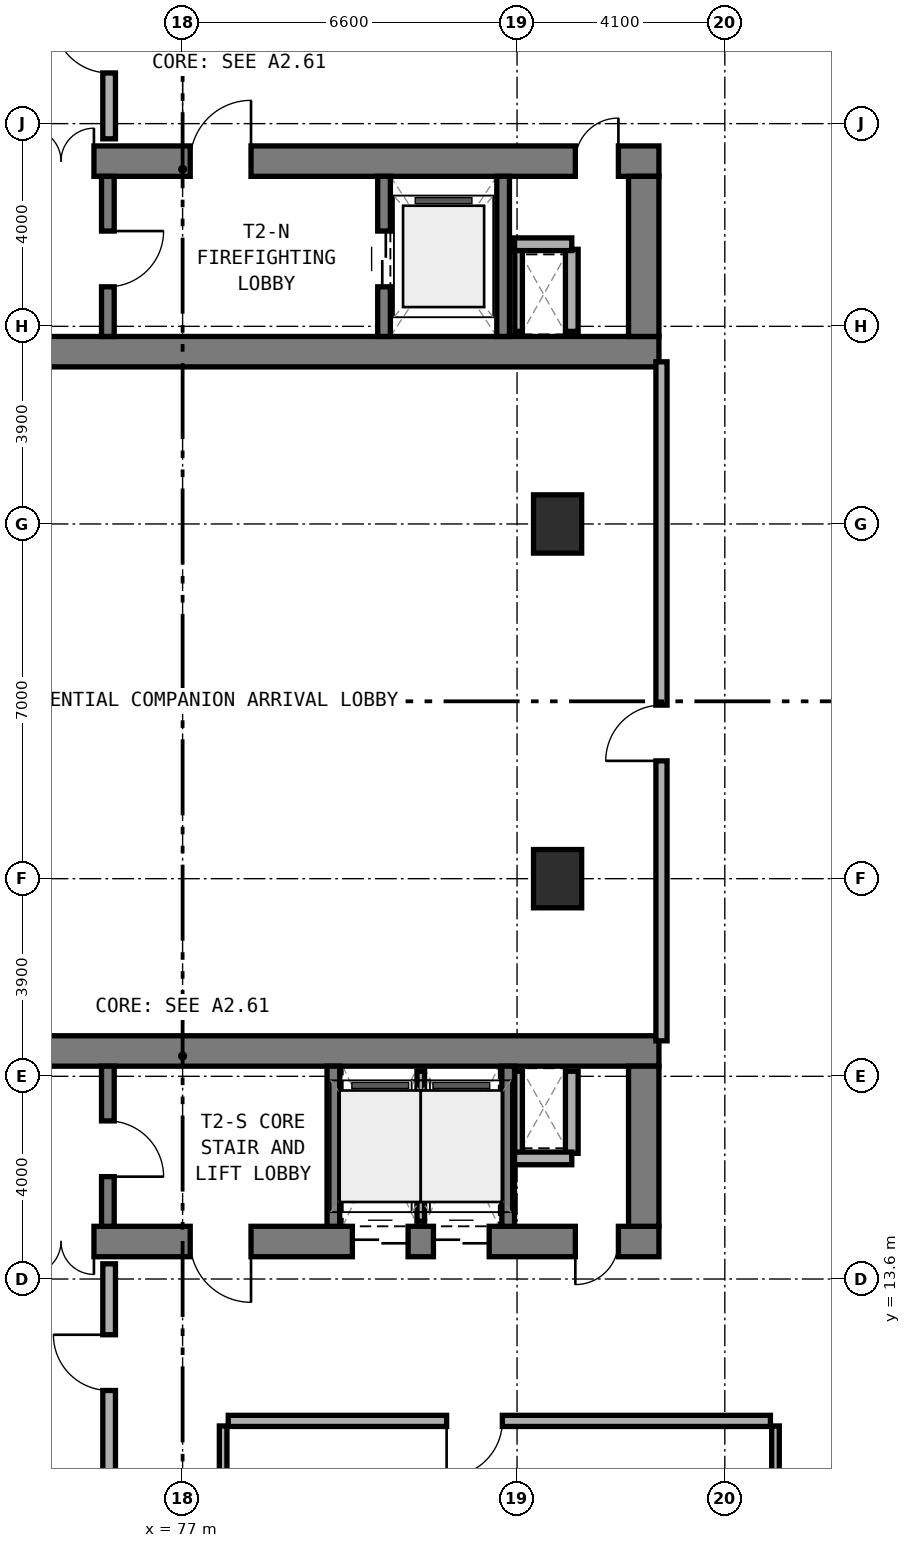
"""IFC4 building model, lengths in metres.
Left out: names, types, materials, properties, quantities, classifications, styles, units other than length and angle.
Written with IfcOpenShell. Run it as: python <this file> out.ifc"""

import sys

from ifc_helpers import new_model, si_unit, direction, frame, frame_2d, origin, origin_2d, place, context, subcontext, project, spatial, rectangle, extrude, element, fill, save


model = new_model("IFC4")
c1 = context("Model", 3, precision=1e-05, world=origin(), true_north=direction((0.0, 1.0)))
c2 = subcontext(c1, "Body", "Model", "MODEL_VIEW")
j1 = project(units=[si_unit("LENGTHUNIT", "METRE"), si_unit("PLANEANGLEUNIT", "RADIAN")], contexts=[c1])
p1 = place(None, origin())
s1 = spatial("IfcSite", under=j1, at=p1, CompositionType="ELEMENT")
p2 = place(p1, origin())
s2 = spatial("IfcBuilding", under=s1, at=p2, CompositionType="ELEMENT")
p3 = place(p2, origin())
s3 = spatial("IfcBuildingStorey", under=s2, at=p3, CompositionType="ELEMENT", Elevation=0.0)
p4 = place(p3, frame((67.8, 31.9, 0.0), z_axis=(0.0, 0.0, 1.0), x_axis=(1.0, 0.0, 0.0)))
e1 = element("IfcWall", 1, at=p4, inside=s3, PredefinedType="SHEAR", context=c2, shape_type="SweptSolid", body=[
    extrude(rectangle(XDim=18.6, YDim=0.6, at=frame_2d((9.3, 0.0))), origin(), (0.0, 0.0, 1.0), 5.4),
])
p5 = place(p3, frame((67.8, 35.66, 0.0), z_axis=(0.0, 0.0, 1.0), x_axis=(1.0, 0.0, 0.0)))
e2 = element("IfcWall", 2, at=p5, inside=s3, PredefinedType="SHEAR", context=c2, shape_type="SweptSolid", body=[
    extrude(rectangle(XDim=18.6, YDim=0.6, at=frame_2d((9.3, 0.0))), origin(), (0.0, 0.0, 1.0), 5.4),
])
p6 = place(p5, frame((9.35, 0.0, 0.0)))
e3 = element("IfcOpeningElement", 3, at=p6, cuts=e2, PredefinedType="OPENING", context=c2, shape_type="SweptSolid", body=[
    extrude(rectangle(XDim=1.2, YDim=2.15, at=frame_2d((0.6, 1.075))), frame((0.0, 0.31, 0.0), z_axis=(0.0, -1.0, 0.0), x_axis=(1.0, 0.0, 0.0)), (0.0, 0.0, 1.0), 0.62),
])
p7 = place(p5, frame((6.15, 0.0, 0.0)))
e4 = element("IfcOpeningElement", 4, at=p7, cuts=e2, PredefinedType="OPENING", context=c2, shape_type="SweptSolid", body=[
    extrude(rectangle(XDim=1.3, YDim=2.15, at=frame_2d((0.65, 1.075))), frame((0.0, 0.31, 0.0), z_axis=(0.0, -1.0, 0.0), x_axis=(1.0, 0.0, 0.0)), (0.0, 0.0, 1.0), 0.62),
])
p8 = place(p5, frame((16.95, 0.0, 0.0)))
e5 = element("IfcOpeningElement", 5, at=p8, cuts=e2, PredefinedType="OPENING", context=c2, shape_type="SweptSolid", body=[
    extrude(rectangle(XDim=0.85, YDim=2.1, at=frame_2d((0.425, 1.05))), frame((0.0, 0.31, 0.0), z_axis=(0.0, -1.0, 0.0), x_axis=(1.0, 0.0, 0.0)), (0.0, 0.0, 1.0), 0.62),
])
p9 = place(p3, frame((86.1, 32.2, 0.0), z_axis=(0.0, 0.0, 1.0), x_axis=(0.0, 1.0, 0.0)))
e6 = element("IfcWall", 6, at=p9, inside=s3, PredefinedType="SHEAR", context=c2, shape_type="SweptSolid", body=[
    extrude(rectangle(XDim=3.16, YDim=0.6, at=frame_2d((1.58, 0.0))), origin(), (0.0, 0.0, 1.0), 5.4),
])
p10 = place(p3, frame((75.525, 32.2, 0.0), z_axis=(0.0, 0.0, 1.0), x_axis=(0.0, 1.0, 0.0)))
e7 = element("IfcWall", 7, at=p10, inside=s3, PredefinedType="STANDARD", context=c2, shape_type="SweptSolid", body=[
    extrude(rectangle(XDim=3.16, YDim=0.25, at=frame_2d((1.58, 0.0))), origin(), (0.0, 0.0, 1.0), 5.05),
])
p11 = place(p10, frame((0.98, 0.0, 0.0)))
e8 = element("IfcOpeningElement", 8, at=p11, cuts=e7, PredefinedType="OPENING", context=c2, shape_type="SweptSolid", body=[
    extrude(rectangle(XDim=1.1, YDim=2.15, at=frame_2d((0.55, 1.075))), frame((0.0, 0.135, 0.0), z_axis=(0.0, -1.0, 0.0), x_axis=(1.0, 0.0, 0.0)), (0.0, 0.0, 1.0), 0.27),
])
p12 = place(p3, frame((80.975, 32.2, 0.0), z_axis=(0.0, 0.0, 1.0), x_axis=(0.0, 1.0, 0.0)))
e9 = element("IfcWall", 9, at=p12, inside=s3, PredefinedType="STANDARD", context=c2, shape_type="SweptSolid", body=[
    extrude(rectangle(XDim=3.16, YDim=0.25, at=frame_2d((1.58, 0.0))), origin(), (0.0, 0.0, 1.0), 5.05),
])
p13 = place(p12, frame((0.98, 0.0, 0.0)))
e10 = element("IfcOpeningElement", 10, at=p13, cuts=e9, PredefinedType="OPENING", context=c2, shape_type="SweptSolid", body=[
    extrude(rectangle(XDim=1.1, YDim=2.15, at=frame_2d((0.55, 1.075))), frame((0.0, 0.135, 0.0), z_axis=(0.0, -1.0, 0.0), x_axis=(1.0, 0.0, 0.0)), (0.0, 0.0, 1.0), 0.27),
])
p14 = place(p3, frame((83.325, 32.2, 0.0), z_axis=(0.0, 0.0, 1.0), x_axis=(0.0, 1.0, 0.0)))
e11 = element("IfcWall", 11, at=p14, inside=s3, PredefinedType="STANDARD", context=c2, shape_type="SweptSolid", body=[
    extrude(rectangle(XDim=3.16, YDim=0.25, at=frame_2d((1.58, 0.0))), origin(), (0.0, 0.0, 1.0), 5.05),
])
p15 = place(p3, frame((67.8, 14.34, 0.0), z_axis=(0.0, 0.0, 1.0), x_axis=(1.0, 0.0, 0.0)))
e12 = element("IfcWall", 12, at=p15, inside=s3, PredefinedType="SHEAR", context=c2, shape_type="SweptSolid", body=[
    extrude(rectangle(XDim=18.6, YDim=0.6, at=frame_2d((9.3, 0.0))), origin(), (0.0, 0.0, 1.0), 5.4),
])
p16 = place(p15, frame((9.35, 0.0, 0.0)))
e13 = element("IfcOpeningElement", 13, at=p16, cuts=e12, PredefinedType="OPENING", context=c2, shape_type="SweptSolid", body=[
    extrude(rectangle(XDim=1.2, YDim=2.15, at=frame_2d((0.6, 1.075))), frame((0.0, 0.31, 0.0), z_axis=(0.0, -1.0, 0.0), x_axis=(1.0, 0.0, 0.0)), (0.0, 0.0, 1.0), 0.62),
])
p17 = place(p15, frame((6.15, 0.0, 0.0)))
e14 = element("IfcOpeningElement", 14, at=p17, cuts=e12, PredefinedType="OPENING", context=c2, shape_type="SweptSolid", body=[
    extrude(rectangle(XDim=1.3, YDim=2.15, at=frame_2d((0.65, 1.075))), frame((0.0, 0.31, 0.0), z_axis=(0.0, -1.0, 0.0), x_axis=(1.0, 0.0, 0.0)), (0.0, 0.0, 1.0), 0.62),
])
p18 = place(p15, frame((16.95, 0.0, 0.0)))
e15 = element("IfcOpeningElement", 15, at=p18, cuts=e12, PredefinedType="OPENING", context=c2, shape_type="SweptSolid", body=[
    extrude(rectangle(XDim=0.85, YDim=2.1, at=frame_2d((0.425, 1.05))), frame((0.0, 0.31, 0.0), z_axis=(0.0, -1.0, 0.0), x_axis=(1.0, 0.0, 0.0)), (0.0, 0.0, 1.0), 0.62),
])
p19 = place(p15, frame((12.55, 0.0, 0.0)))
e16 = element("IfcOpeningElement", 16, at=p19, cuts=e12, PredefinedType="OPENING", context=c2, shape_type="SweptSolid", body=[
    extrude(rectangle(XDim=1.1, YDim=2.15, at=frame_2d((0.55, 1.075))), frame((0.0, 0.31, 0.0), z_axis=(0.0, -1.0, 0.0), x_axis=(1.0, 0.0, 0.0)), (0.0, 0.0, 1.0), 0.62),
])
p20 = place(p15, frame((14.15, 0.0, 0.0)))
e17 = element("IfcOpeningElement", 17, at=p20, cuts=e12, PredefinedType="OPENING", context=c2, shape_type="SweptSolid", body=[
    extrude(rectangle(XDim=1.1, YDim=2.15, at=frame_2d((0.55, 1.075))), frame((0.0, 0.31, 0.0), z_axis=(0.0, -1.0, 0.0), x_axis=(1.0, 0.0, 0.0)), (0.0, 0.0, 1.0), 0.62),
])
p21 = place(p3, frame((67.8, 18.1, 0.0), z_axis=(0.0, 0.0, 1.0), x_axis=(1.0, 0.0, 0.0)))
e18 = element("IfcWall", 18, at=p21, inside=s3, PredefinedType="SHEAR", context=c2, shape_type="SweptSolid", body=[
    extrude(rectangle(XDim=18.6, YDim=0.6, at=frame_2d((9.3, 0.0))), origin(), (0.0, 0.0, 1.0), 5.4),
])
p22 = place(p3, frame((86.1, 14.64, 0.0), z_axis=(0.0, 0.0, 1.0), x_axis=(0.0, 1.0, 0.0)))
e19 = element("IfcWall", 19, at=p22, inside=s3, PredefinedType="SHEAR", context=c2, shape_type="SweptSolid", body=[
    extrude(rectangle(XDim=3.16, YDim=0.6, at=frame_2d((1.58, 0.0))), origin(), (0.0, 0.0, 1.0), 5.4),
])
p23 = place(p3, frame((75.525, 14.64, 0.0), z_axis=(0.0, 0.0, 1.0), x_axis=(0.0, 1.0, 0.0)))
e20 = element("IfcWall", 20, at=p23, inside=s3, PredefinedType="STANDARD", context=c2, shape_type="SweptSolid", body=[
    extrude(rectangle(XDim=3.16, YDim=0.25, at=frame_2d((1.58, 0.0))), origin(), (0.0, 0.0, 1.0), 5.05),
])
p24 = place(p23, frame((0.98, 0.0, 0.0)))
e21 = element("IfcOpeningElement", 21, at=p24, cuts=e20, PredefinedType="OPENING", context=c2, shape_type="SweptSolid", body=[
    extrude(rectangle(XDim=1.1, YDim=2.15, at=frame_2d((0.55, 1.075))), frame((0.0, 0.135, 0.0), z_axis=(0.0, -1.0, 0.0), x_axis=(1.0, 0.0, 0.0)), (0.0, 0.0, 1.0), 0.27),
])
for number, where, z_axis, x_axis in (
    (22, (79.975, 14.64, 0.0), (0.0, 0.0, 1.0), (0.0, 1.0, 0.0)),
    (23, (83.425, 14.64, 0.0), (0.0, 0.0, 1.0), (0.0, 1.0, 0.0)),
):
    element("IfcWall", number, at=place(p3, frame(where, z_axis=z_axis, x_axis=x_axis)), inside=s3, PredefinedType="STANDARD", context=c2, shape_type="SweptSolid", body=[
        extrude(rectangle(XDim=3.16, YDim=0.25, at=frame_2d((1.58, 0.0))), origin(), (0.0, 0.0, 1.0), 5.05),
    ])
for number, where, z_axis, x_axis in (
    (24, (84.4, 21.5, 0.0), (0.0, 0.0, 1.0), (1.0, 0.0, 0.0)),
    (25, (84.4, 28.5, 0.0), (0.0, 0.0, 1.0), (1.0, 0.0, 0.0)),
):
    element("IfcColumn", number, at=place(p3, frame(where, z_axis=z_axis, x_axis=x_axis)), inside=s3, PredefinedType="COLUMN", context=c2, shape_type="SweptSolid", body=[
        extrude(rectangle(XDim=0.95, YDim=1.15, at=origin_2d()), origin(), (0.0, 0.0, 1.0), 5.4),
    ])
p25 = place(p3, frame((83.63, 32.3, 0.0), z_axis=(0.0, 0.0, 1.0), x_axis=(0.0, 1.0, 0.0)))
e26 = element("IfcWall", 26, at=p25, inside=s3, PredefinedType="PARTITIONING", context=c2, shape_type="SweptSolid", body=[
    extrude(rectangle(XDim=1.62, YDim=0.15, at=frame_2d((0.81, 0.0))), origin(), (0.0, 0.0, 1.0), 4.525),
])
p26 = place(p3, frame((84.68, 32.3, 0.0), z_axis=(0.0, 0.0, 1.0), x_axis=(0.0, 1.0, 0.0)))
e27 = element("IfcWall", 27, at=p26, inside=s3, PredefinedType="SOLIDWALL", context=c2, shape_type="SweptSolid", body=[
    extrude(rectangle(XDim=1.62, YDim=0.25, at=frame_2d((0.81, 0.0))), origin(), (0.0, 0.0, 1.0), 5.05),
])
p27 = place(p3, frame((83.55, 34.02, 0.0), z_axis=(0.0, 0.0, 1.0), x_axis=(1.0, 0.0, 0.0)))
e28 = element("IfcWall", 28, at=p27, inside=s3, PredefinedType="SOLIDWALL", context=c2, shape_type="SweptSolid", body=[
    extrude(rectangle(XDim=1.13, YDim=0.25, at=frame_2d((0.565, 0.0))), origin(), (0.0, 0.0, 1.0), 5.05),
])
p28 = place(p3, frame((83.63, 16.08, 0.0), z_axis=(0.0, 0.0, 1.0), x_axis=(0.0, 1.0, 0.0)))
e29 = element("IfcWall", 29, at=p28, inside=s3, PredefinedType="PARTITIONING", context=c2, shape_type="SweptSolid", body=[
    extrude(rectangle(XDim=1.62, YDim=0.15, at=frame_2d((0.81, 0.0))), origin(), (0.0, 0.0, 1.0), 4.525),
])
p29 = place(p3, frame((84.68, 16.08, 0.0), z_axis=(0.0, 0.0, 1.0), x_axis=(0.0, 1.0, 0.0)))
e30 = element("IfcWall", 30, at=p29, inside=s3, PredefinedType="SOLIDWALL", context=c2, shape_type="SweptSolid", body=[
    extrude(rectangle(XDim=1.62, YDim=0.25, at=frame_2d((0.81, 0.0))), origin(), (0.0, 0.0, 1.0), 5.05),
])
p30 = place(p3, frame((83.55, 15.98, 0.0), z_axis=(0.0, 0.0, 1.0), x_axis=(1.0, 0.0, 0.0)))
e31 = element("IfcWall", 31, at=p30, inside=s3, PredefinedType="SOLIDWALL", context=c2, shape_type="SweptSolid", body=[
    extrude(rectangle(XDim=1.13, YDim=0.25, at=frame_2d((0.565, 0.0))), origin(), (0.0, 0.0, 1.0), 5.05),
])
p31 = place(p3, frame((81.7, 14.74, 0.0), z_axis=(0.0, 0.0, 1.0), x_axis=(0.0, 1.0, 0.0)))
e32 = element("IfcWall", 32, at=p31, inside=s3, PredefinedType="PARTITIONING", context=c2, shape_type="SweptSolid", body=[
    extrude(rectangle(XDim=2.96, YDim=0.15, at=frame_2d((1.48, 0.0))), origin(), (0.0, 0.0, 1.0), 5.05),
])
p32 = place(p3, frame((75.55, 36.1, 0.0), z_axis=(0.0, 0.0, 1.0), x_axis=(0.0, 1.0, 0.0)))
e33 = element("IfcWall", 33, at=p32, inside=s3, PredefinedType="SOLIDWALL", context=c2, shape_type="SweptSolid", body=[
    extrude(rectangle(XDim=13.45, YDim=0.25, at=frame_2d((6.725, 0.0))), origin(), (0.0, 0.0, 1.0), 4.425),
])
p33 = place(p32, frame((1.3, 0.0, 0.0)))
e34 = element("IfcOpeningElement", 34, at=p33, cuts=e33, PredefinedType="OPENING", context=c2, shape_type="SweptSolid", body=[
    extrude(rectangle(XDim=1.1, YDim=2.15, at=frame_2d((0.55, 1.075))), frame((0.0, 0.135, 0.0), z_axis=(0.0, -1.0, 0.0), x_axis=(1.0, 0.0, 0.0)), (0.0, 0.0, 1.0), 0.27),
])
p34 = place(p3, frame((75.55, 0.45, 0.0), z_axis=(0.0, 0.0, 1.0), x_axis=(0.0, 1.0, 0.0)))
e35 = element("IfcWall", 35, at=p34, inside=s3, PredefinedType="SOLIDWALL", context=c2, shape_type="SweptSolid", body=[
    extrude(rectangle(XDim=13.45, YDim=0.25, at=frame_2d((6.725, 0.0))), origin(), (0.0, 0.0, 1.0), 4.425),
])
p35 = place(p34, frame((10.95, 0.0, 0.0)))
e36 = element("IfcOpeningElement", 36, at=p35, cuts=e35, PredefinedType="OPENING", context=c2, shape_type="SweptSolid", body=[
    extrude(rectangle(XDim=1.1, YDim=2.15, at=frame_2d((0.55, 1.075))), frame((0.0, 0.135, 0.0), z_axis=(0.0, -1.0, 0.0), x_axis=(1.0, 0.0, 0.0)), (0.0, 0.0, 1.0), 0.27),
])
p36 = place(p3, frame((86.45, 18.3, 0.0), z_axis=(0.0, 0.0, 1.0), x_axis=(0.0, 1.0, 0.0)))
e37 = element("IfcWall", 37, at=p36, inside=s3, PredefinedType="SOLIDWALL", context=c2, shape_type="SweptSolid", body=[
    extrude(rectangle(XDim=13.4, YDim=0.22, at=frame_2d((6.7, 0.0))), origin(), (0.0, 0.0, 1.0), 4.525),
])
p37 = place(p36, frame((5.525, 0.0, 0.0)))
e38 = element("IfcOpeningElement", 38, at=p37, cuts=e37, PredefinedType="OPENING", context=c2, shape_type="SweptSolid", body=[
    extrude(rectangle(XDim=1.1, YDim=2.1, at=frame_2d((0.55, 1.05))), frame((0.0, 0.12, 0.0), z_axis=(0.0, -1.0, 0.0), x_axis=(1.0, 0.0, 0.0)), (0.0, 0.0, 1.0), 0.24),
])
p38 = place(p3, frame((77.8, 0.48, 0.0), z_axis=(0.0, 0.0, 1.0), x_axis=(0.0, 1.0, 0.0)))
e39 = element("IfcWall", 39, at=p38, inside=s3, PredefinedType="PARTITIONING", context=c2, shape_type="SweptSolid", body=[
    extrude(rectangle(XDim=10.22, YDim=0.15, at=frame_2d((5.11, 0.0))), origin(), (0.0, 0.0, 1.0), 4.425),
])
p39 = place(p3, frame((88.7, 0.48, 0.0), z_axis=(0.0, 0.0, 1.0), x_axis=(0.0, 1.0, 0.0)))
e40 = element("IfcWall", 40, at=p39, inside=s3, PredefinedType="PARTITIONING", context=c2, shape_type="SweptSolid", body=[
    extrude(rectangle(XDim=10.22, YDim=0.15, at=frame_2d((5.11, 0.0))), origin(), (0.0, 0.0, 1.0), 4.225),
])
p40 = place(p3, frame((77.9, 10.8, 0.0), z_axis=(0.0, 0.0, 1.0), x_axis=(1.0, 0.0, 0.0)))
e41 = element("IfcWall", 41, at=p40, inside=s3, PredefinedType="SOLIDWALL", context=c2, shape_type="SweptSolid", body=[
    extrude(rectangle(XDim=10.7, YDim=0.22, at=frame_2d((5.35, 0.0))), origin(), (0.0, 0.0, 1.0), 4.525),
])
p41 = place(p40, frame((4.31, 0.0, 0.0)))
e42 = element("IfcOpeningElement", 42, at=p41, cuts=e41, PredefinedType="OPENING", context=c2, shape_type="SweptSolid", body=[
    extrude(rectangle(XDim=1.1, YDim=2.1, at=frame_2d((0.55, 1.05))), frame((0.0, 0.12, 0.0), z_axis=(0.0, -1.0, 0.0), x_axis=(1.0, 0.0, 0.0)), (0.0, 0.0, 1.0), 0.24),
])
p42 = place(p11, frame((1.1, 0.0, 0.0), z_axis=(0.0, 0.0, 1.0), x_axis=(-1.0, 0.0, 0.0)))
e43 = element("IfcDoor", 43, at=p42, inside=s3, OperationType="SINGLE_SWING_LEFT", PredefinedType="DOOR", context=c2, shape_type="SweptSolid", body=[
    extrude(rectangle(XDim=1.1, YDim=2.15, at=frame_2d((0.55, 1.075))), frame((0.0, 0.025, 0.0), z_axis=(0.0, -1.0, 0.0), x_axis=(1.0, 0.0, 0.0)), (0.0, 0.0, 1.0), 0.05),
])
fill(e8, e43)
p43 = place(p6, origin())
e44 = element("IfcDoor", 44, at=p43, inside=s3, OperationType="SINGLE_SWING_RIGHT", PredefinedType="DOOR", context=c2, shape_type="SweptSolid", body=[
    extrude(rectangle(XDim=1.2, YDim=2.15, at=frame_2d((0.6, 1.075))), frame((0.0, 0.025, 0.0), z_axis=(0.0, -1.0, 0.0), x_axis=(1.0, 0.0, 0.0)), (0.0, 0.0, 1.0), 0.05),
])
fill(e3, e44)
p44 = place(p7, origin())
e45 = element("IfcDoor", 45, at=p44, inside=s3, OperationType="DOUBLE_DOOR_SINGLE_SWING", PredefinedType="DOOR", context=c2, shape_type="SweptSolid", body=[
    extrude(rectangle(XDim=1.3, YDim=2.15, at=frame_2d((0.65, 1.075))), frame((0.0, 0.025, 0.0), z_axis=(0.0, -1.0, 0.0), x_axis=(1.0, 0.0, 0.0)), (0.0, 0.0, 1.0), 0.05),
])
fill(e4, e45)
p45 = place(p13, origin())
e46 = element("IfcDoor", 46, at=p45, inside=s3, OperationType="DOUBLE_DOOR_SLIDING", PredefinedType="DOOR", context=c2, shape_type="SweptSolid", body=[
    extrude(rectangle(XDim=1.1, YDim=2.15, at=frame_2d((0.55, 1.075))), frame((0.0, 0.025, 0.0), z_axis=(0.0, -1.0, 0.0), x_axis=(1.0, 0.0, 0.0)), (0.0, 0.0, 1.0), 0.05),
])
fill(e10, e46)
p46 = place(p8, origin())
e47 = element("IfcDoor", 47, at=p46, inside=s3, OperationType="SINGLE_SWING_RIGHT", PredefinedType="DOOR", context=c2, shape_type="SweptSolid", body=[
    extrude(rectangle(XDim=0.85, YDim=2.1, at=frame_2d((0.425, 1.05))), frame((0.0, 0.025, 0.0), z_axis=(0.0, -1.0, 0.0), x_axis=(1.0, 0.0, 0.0)), (0.0, 0.0, 1.0), 0.05),
])
fill(e5, e47)
p47 = place(p24, frame((1.1, 0.0, 0.0), z_axis=(0.0, 0.0, 1.0), x_axis=(-1.0, 0.0, 0.0)))
e48 = element("IfcDoor", 48, at=p47, inside=s3, OperationType="SINGLE_SWING_RIGHT", PredefinedType="DOOR", context=c2, shape_type="SweptSolid", body=[
    extrude(rectangle(XDim=1.1, YDim=2.15, at=frame_2d((0.55, 1.075))), frame((0.0, 0.025, 0.0), z_axis=(0.0, -1.0, 0.0), x_axis=(1.0, 0.0, 0.0)), (0.0, 0.0, 1.0), 0.05),
])
fill(e21, e48)
p48 = place(p16, frame((1.2, 0.0, 0.0), z_axis=(0.0, 0.0, 1.0), x_axis=(-1.0, 0.0, 0.0)))
e49 = element("IfcDoor", 49, at=p48, inside=s3, OperationType="SINGLE_SWING_LEFT", PredefinedType="DOOR", context=c2, shape_type="SweptSolid", body=[
    extrude(rectangle(XDim=1.2, YDim=2.15, at=frame_2d((0.6, 1.075))), frame((0.0, 0.025, 0.0), z_axis=(0.0, -1.0, 0.0), x_axis=(1.0, 0.0, 0.0)), (0.0, 0.0, 1.0), 0.05),
])
fill(e13, e49)
p49 = place(p17, frame((1.3, 0.0, 0.0), z_axis=(0.0, 0.0, 1.0), x_axis=(-1.0, 0.0, 0.0)))
e50 = element("IfcDoor", 50, at=p49, inside=s3, OperationType="DOUBLE_DOOR_SINGLE_SWING", PredefinedType="DOOR", context=c2, shape_type="SweptSolid", body=[
    extrude(rectangle(XDim=1.3, YDim=2.15, at=frame_2d((0.65, 1.075))), frame((0.0, 0.025, 0.0), z_axis=(0.0, -1.0, 0.0), x_axis=(1.0, 0.0, 0.0)), (0.0, 0.0, 1.0), 0.05),
])
fill(e14, e50)
p50 = place(p18, frame((0.85, 0.0, 0.0), z_axis=(0.0, 0.0, 1.0), x_axis=(-1.0, 0.0, 0.0)))
e51 = element("IfcDoor", 51, at=p50, inside=s3, OperationType="SINGLE_SWING_RIGHT", PredefinedType="DOOR", context=c2, shape_type="SweptSolid", body=[
    extrude(rectangle(XDim=0.85, YDim=2.1, at=frame_2d((0.425, 1.05))), frame((0.0, 0.025, 0.0), z_axis=(0.0, -1.0, 0.0), x_axis=(1.0, 0.0, 0.0)), (0.0, 0.0, 1.0), 0.05),
])
fill(e15, e51)
p51 = place(p19, frame((1.1, 0.0, 0.0), z_axis=(0.0, 0.0, 1.0), x_axis=(-1.0, 0.0, 0.0)))
e52 = element("IfcDoor", 52, at=p51, inside=s3, OperationType="DOUBLE_DOOR_SLIDING", PredefinedType="DOOR", context=c2, shape_type="SweptSolid", body=[
    extrude(rectangle(XDim=1.1, YDim=2.15, at=frame_2d((0.55, 1.075))), frame((0.0, 0.025, 0.0), z_axis=(0.0, -1.0, 0.0), x_axis=(1.0, 0.0, 0.0)), (0.0, 0.0, 1.0), 0.05),
])
fill(e16, e52)
p52 = place(p20, frame((1.1, 0.0, 0.0), z_axis=(0.0, 0.0, 1.0), x_axis=(-1.0, 0.0, 0.0)))
e53 = element("IfcDoor", 53, at=p52, inside=s3, OperationType="DOUBLE_DOOR_SLIDING", PredefinedType="DOOR", context=c2, shape_type="SweptSolid", body=[
    extrude(rectangle(XDim=1.1, YDim=2.15, at=frame_2d((0.55, 1.075))), frame((0.0, 0.025, 0.0), z_axis=(0.0, -1.0, 0.0), x_axis=(1.0, 0.0, 0.0)), (0.0, 0.0, 1.0), 0.05),
])
fill(e17, e53)
p53 = place(p33, origin())
e54 = element("IfcDoor", 54, at=p53, inside=s3, OperationType="SINGLE_SWING_RIGHT", PredefinedType="DOOR", context=c2, shape_type="SweptSolid", body=[
    extrude(rectangle(XDim=1.1, YDim=2.15, at=frame_2d((0.55, 1.075))), frame((0.0, 0.025, 0.0), z_axis=(0.0, -1.0, 0.0), x_axis=(1.0, 0.0, 0.0)), (0.0, 0.0, 1.0), 0.05),
])
fill(e34, e54)
p54 = place(p35, origin())
e55 = element("IfcDoor", 55, at=p54, inside=s3, OperationType="SINGLE_SWING_RIGHT", PredefinedType="DOOR", context=c2, shape_type="SweptSolid", body=[
    extrude(rectangle(XDim=1.1, YDim=2.15, at=frame_2d((0.55, 1.075))), frame((0.0, 0.025, 0.0), z_axis=(0.0, -1.0, 0.0), x_axis=(1.0, 0.0, 0.0)), (0.0, 0.0, 1.0), 0.05),
])
fill(e36, e55)
p55 = place(p37, origin())
e56 = element("IfcDoor", 56, at=p55, inside=s3, OperationType="SINGLE_SWING_LEFT", PredefinedType="DOOR", context=c2, shape_type="SweptSolid", body=[
    extrude(rectangle(XDim=1.1, YDim=2.1, at=frame_2d((0.55, 1.05))), frame((0.0, 0.025, 0.0), z_axis=(0.0, -1.0, 0.0), x_axis=(1.0, 0.0, 0.0)), (0.0, 0.0, 1.0), 0.05),
])
fill(e38, e56)
p56 = place(p41, frame((1.1, 0.0, 0.0), z_axis=(0.0, 0.0, 1.0), x_axis=(-1.0, 0.0, 0.0)))
e57 = element("IfcDoor", 57, at=p56, inside=s3, OperationType="SINGLE_SWING_RIGHT", PredefinedType="DOOR", context=c2, shape_type="SweptSolid", body=[
    extrude(rectangle(XDim=1.1, YDim=2.1, at=frame_2d((0.55, 1.05))), frame((0.0, 0.025, 0.0), z_axis=(0.0, -1.0, 0.0), x_axis=(1.0, 0.0, 0.0)), (0.0, 0.0, 1.0), 0.05),
])
fill(e42, e57)
save(model, sys.argv[1])
